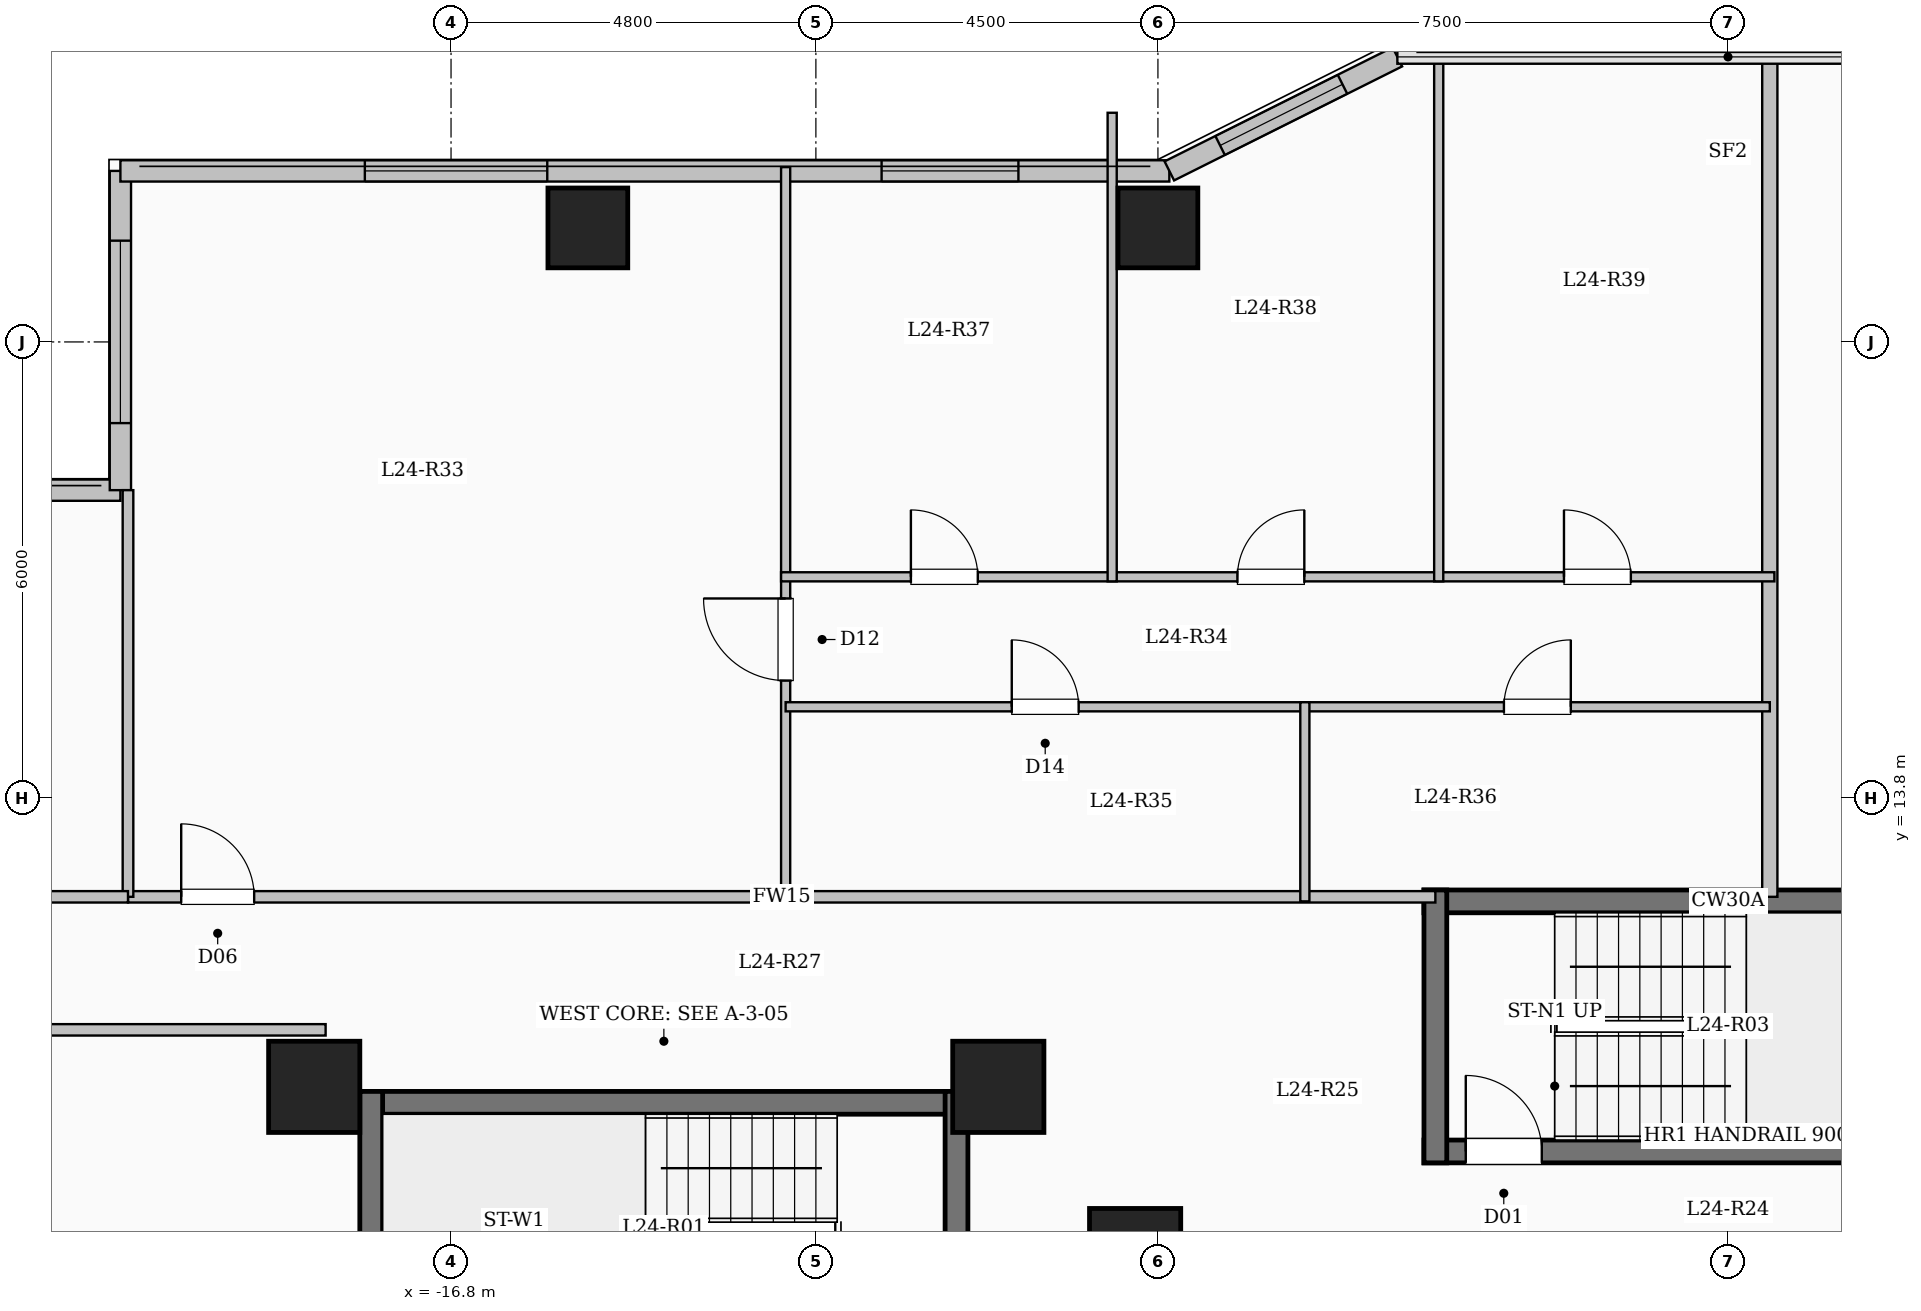
"""IFC4 building model, lengths in metres.
Left out: names, types, materials, properties, quantities, classifications, styles, units other than length and angle.
Written with IfcOpenShell. Run it as: python <this file> out.ifc"""

import sys

from ifc_helpers import new_model, si_unit, direction, frame, frame_2d, origin, origin_2d, place, context, subcontext, project, spatial, rectangle, extrude, element, fill, save


model = new_model("IFC4")
c1 = context("Model", 3, precision=1e-05, world=origin(), true_north=direction((0.0, 1.0)))
c2 = subcontext(c1, "Body", "Model", "MODEL_VIEW")
j1 = project(units=[si_unit("LENGTHUNIT", "METRE"), si_unit("PLANEANGLEUNIT", "RADIAN")], contexts=[c1])
p1 = place(None, origin())
s1 = spatial("IfcSite", under=j1, at=p1, CompositionType="ELEMENT")
p2 = place(p1, origin())
s2 = spatial("IfcBuilding", under=s1, at=p2, CompositionType="ELEMENT")
p3 = place(p2, frame((0.0, 0.0, 91.7)))
s3 = spatial("IfcBuildingStorey", under=s2, at=p3, CompositionType="ELEMENT", Elevation=91.7)
for number, where, z_axis, x_axis in (
    (1, (-7.8, 7.8, 0.0), (0.0, 0.0, 1.0), (1.0, 0.0, 0.0)),
    (2, (-9.6, 10.0, 0.0), (0.0, 0.0, 1.0), (1.0, 0.0, 0.0)),
    (3, (-18.6, 10.0, 0.0), (0.0, 0.0, 1.0), (1.0, 0.0, 0.0)),
):
    element("IfcColumn", number, at=place(p3, frame(where, z_axis=z_axis, x_axis=x_axis)), inside=s3, PredefinedType="COLUMN", context=c2, shape_type="SweptSolid", body=[
        extrude(rectangle(XDim=1.2, YDim=1.2, at=origin_2d()), origin(), (0.0, 0.0, 1.0), 3.35),
    ])
for number, where, z_axis, x_axis in (
    (4, (-15.0, 21.3, 0.0), (0.0, 0.0, 1.0), (1.0, 0.0, 0.0)),
    (5, (-7.5, 21.3, 0.0), (0.0, 0.0, 1.0), (1.0, 0.0, 0.0)),
):
    element("IfcColumn", number, at=place(p3, frame(where, z_axis=z_axis, x_axis=x_axis)), inside=s3, PredefinedType="COLUMN", context=c2, shape_type="SweptSolid", body=[
        extrude(rectangle(XDim=1.05, YDim=1.05, at=origin_2d()), origin(), (0.0, 0.0, 1.0), 3.35),
    ])
p4 = place(p3, frame((-26.85, 17.85, 0.0), z_axis=(0.0, 0.0, 1.0), x_axis=(1.0, 0.0, 0.0)))
e6 = element("IfcWall", 6, at=p4, inside=s3, PredefinedType="SOLIDWALL", context=c2, shape_type="SweptSolid", body=[
    extrude(rectangle(XDim=5.7, YDim=0.28, at=frame_2d((2.85, 0.0))), origin(), (0.0, 0.0, 1.0), 3.1),
])
p5 = place(p4, frame((1.875, 0.0, 0.9)))
e7 = element("IfcOpeningElement", 7, at=p5, cuts=e6, PredefinedType="OPENING", context=c2, shape_type="SweptSolid", body=[
    extrude(rectangle(XDim=2.0, YDim=1.7, at=frame_2d((1.0, 0.85))), frame((0.0, 0.15, 0.0), z_axis=(0.0, -1.0, 0.0), x_axis=(1.0, 0.0, 0.0)), (0.0, 0.0, 1.0), 0.3),
])
p6 = place(p3, frame((-21.15, 17.85, 0.0), z_axis=(0.0, 0.0, 1.0), x_axis=(0.0, 1.0, 0.0)))
e8 = element("IfcWall", 8, at=p6, inside=s3, PredefinedType="SOLIDWALL", context=c2, shape_type="SweptSolid", body=[
    extrude(rectangle(XDim=4.2, YDim=0.28, at=frame_2d((2.1, 0.0))), origin(), (0.0, 0.0, 1.0), 3.1),
])
p7 = place(p6, frame((0.882, 0.0, 0.9)))
e9 = element("IfcOpeningElement", 9, at=p7, cuts=e8, PredefinedType="OPENING", context=c2, shape_type="SweptSolid", body=[
    extrude(rectangle(XDim=2.4, YDim=1.8, at=frame_2d((1.2, 0.9))), frame((0.0, 0.15, 0.0), z_axis=(0.0, -1.0, 0.0), x_axis=(1.0, 0.0, 0.0)), (0.0, 0.0, 1.0), 0.3),
])
p8 = place(p3, frame((-21.15, 22.05, 0.0), z_axis=(0.0, 0.0, 1.0), x_axis=(1.0, 0.0, 0.0)))
e10 = element("IfcWall", 10, at=p8, inside=s3, PredefinedType="SOLIDWALL", context=c2, shape_type="SweptSolid", body=[
    extrude(rectangle(XDim=13.8, YDim=0.28, at=frame_2d((6.9, 0.0))), origin(), (0.0, 0.0, 1.0), 3.1),
])
p9 = place(p8, frame((3.216, 0.0, 0.9)))
e11 = element("IfcOpeningElement", 11, at=p9, cuts=e10, PredefinedType="OPENING", context=c2, shape_type="SweptSolid", body=[
    extrude(rectangle(XDim=2.4, YDim=1.8, at=frame_2d((1.2, 0.9))), frame((0.0, 0.15, 0.0), z_axis=(0.0, -1.0, 0.0), x_axis=(1.0, 0.0, 0.0)), (0.0, 0.0, 1.0), 0.3),
])
p10 = place(p8, frame((10.014, 0.0, 0.9)))
e12 = element("IfcOpeningElement", 12, at=p10, cuts=e10, PredefinedType="OPENING", context=c2, shape_type="SweptSolid", body=[
    extrude(rectangle(XDim=1.8, YDim=1.65, at=frame_2d((0.9, 0.825))), frame((0.0, 0.15, 0.0), z_axis=(0.0, -1.0, 0.0), x_axis=(1.0, 0.0, 0.0)), (0.0, 0.0, 1.0), 0.3),
])
p11 = place(p3, frame((-7.35, 22.05, 0.0), z_axis=(0.0, 0.0, 1.0), x_axis=(0.894427191, 0.4472135955, 0.0)))
e13 = element("IfcWall", 13, at=p11, inside=s3, PredefinedType="SOLIDWALL", context=c2, shape_type="SweptSolid", body=[
    extrude(rectangle(XDim=3.354, YDim=0.28, at=frame_2d((1.677, 0.0))), origin(), (0.0, 0.0, 1.0), 3.1),
])
p12 = place(p11, frame((0.747, 0.0, 0.9)))
e14 = element("IfcOpeningElement", 14, at=p12, cuts=e13, PredefinedType="OPENING", context=c2, shape_type="SweptSolid", body=[
    extrude(rectangle(XDim=1.8, YDim=1.65, at=frame_2d((0.9, 0.825))), frame((0.0, 0.15, 0.0), z_axis=(0.0, -1.0, 0.0), x_axis=(1.0, 0.0, 0.0)), (0.0, 0.0, 1.0), 0.3),
])
p13 = place(p3, frame((-18.0, 9.79, 0.0), z_axis=(0.0, 0.0, 1.0), x_axis=(1.0, 0.0, 0.0)))
e15 = element("IfcWall", 15, at=p13, inside=s3, PredefinedType="SHEAR", context=c2, shape_type="SweptSolid", body=[
    extrude(rectangle(XDim=8.0, YDim=0.3, at=frame_2d((4.0, 0.0))), origin(), (0.0, 0.0, 1.0), 3.35),
])
for number, where, z_axis, x_axis in (
    (16, (-17.85, 6.35, 0.0), (0.0, 0.0, 1.0), (0.0, 1.0, 0.0)),
    (17, (-10.15, 6.35, 0.0), (0.0, 0.0, 1.0), (0.0, 1.0, 0.0)),
):
    element("IfcWall", number, at=place(p3, frame(where, z_axis=z_axis, x_axis=x_axis)), inside=s3, PredefinedType="SHEAR", context=c2, shape_type="SweptSolid", body=[
        extrude(rectangle(XDim=3.59, YDim=0.3, at=frame_2d((1.795, 0.0))), origin(), (0.0, 0.0, 1.0), 3.35),
    ])
p14 = place(p3, frame((-4.0, 12.44, 0.0), z_axis=(0.0, 0.0, 1.0), x_axis=(1.0, 0.0, 0.0)))
e18 = element("IfcWall", 18, at=p14, inside=s3, PredefinedType="SHEAR", context=c2, shape_type="SweptSolid", body=[
    extrude(rectangle(XDim=8.0, YDim=0.3, at=frame_2d((4.0, 0.0))), origin(), (0.0, 0.0, 1.0), 3.35),
])
p15 = place(p3, frame((-4.0, 9.15, 0.0), z_axis=(0.0, 0.0, 1.0), x_axis=(1.0, 0.0, 0.0)))
e19 = element("IfcWall", 19, at=p15, inside=s3, PredefinedType="SHEAR", context=c2, shape_type="SweptSolid", body=[
    extrude(rectangle(XDim=8.0, YDim=0.3, at=frame_2d((4.0, 0.0))), origin(), (0.0, 0.0, 1.0), 3.35),
])
p16 = place(p15, frame((0.55, 0.0, 0.0)))
e20 = element("IfcOpeningElement", 20, at=p16, cuts=e19, PredefinedType="OPENING", context=c2, shape_type="SweptSolid", body=[
    extrude(rectangle(XDim=1.0, YDim=2.15, at=frame_2d((0.5, 1.075))), frame((0.0, 0.16, 0.0), z_axis=(0.0, -1.0, 0.0), x_axis=(1.0, 0.0, 0.0)), (0.0, 0.0, 1.0), 0.32),
])
p17 = place(p3, frame((-3.85, 9.0, 0.0), z_axis=(0.0, 0.0, 1.0), x_axis=(0.0, 1.0, 0.0)))
e21 = element("IfcWall", 21, at=p17, inside=s3, PredefinedType="SHEAR", context=c2, shape_type="SweptSolid", body=[
    extrude(rectangle(XDim=3.59, YDim=0.3, at=frame_2d((1.795, 0.0))), origin(), (0.0, 0.0, 1.0), 3.35),
])
p18 = place(p3, frame((-21.05, 12.5, 0.0), z_axis=(0.0, 0.0, 1.0), x_axis=(1.0, 0.0, 0.0)))
e22 = element("IfcWall", 22, at=p18, inside=s3, PredefinedType="PARTITIONING", context=c2, shape_type="SweptSolid", body=[
    extrude(rectangle(XDim=17.2, YDim=0.15, at=frame_2d((8.6, 0.0))), origin(), (0.0, 0.0, 1.0), 3.1),
])
p19 = place(p18, frame((0.7, 0.0, 0.0)))
e23 = element("IfcOpeningElement", 23, at=p19, cuts=e22, PredefinedType="OPENING", context=c2, shape_type="SweptSolid", body=[
    extrude(rectangle(XDim=0.96, YDim=2.15, at=frame_2d((0.48, 1.075))), frame((0.0, 0.085, 0.0), z_axis=(0.0, -1.0, 0.0), x_axis=(1.0, 0.0, 0.0)), (0.0, 0.0, 1.0), 0.17),
])
p20 = place(p3, frame((0.55, 12.5, 0.0), z_axis=(0.0, 0.0, 1.0), x_axis=(0.0, 1.0, 0.0)))
e24 = element("IfcWall", 24, at=p20, inside=s3, PredefinedType="SOLIDWALL", context=c2, shape_type="SweptSolid", body=[
    extrude(rectangle(XDim=11.08, YDim=0.2, at=frame_2d((5.54, 0.0))), origin(), (0.0, 0.0, 1.0), 3.1),
])
p21 = place(p3, frame((-12.398, 12.44, 0.0), z_axis=(0.0, 0.0, 1.0), x_axis=(0.0, 1.0, 0.0)))
e25 = element("IfcWall", 25, at=p21, inside=s3, PredefinedType="PARTITIONING", context=c2, shape_type="SweptSolid", body=[
    extrude(rectangle(XDim=9.66, YDim=0.12, at=frame_2d((4.83, 0.0))), origin(), (0.0, 0.0, 1.0), 3.1),
])
p22 = place(p21, frame((2.905, 0.0, 0.0)))
e26 = element("IfcOpeningElement", 26, at=p22, cuts=e25, PredefinedType="OPENING", context=c2, shape_type="SweptSolid", body=[
    extrude(rectangle(XDim=1.08, YDim=2.15, at=frame_2d((0.54, 1.075))), frame((0.0, 0.07, 0.0), z_axis=(0.0, -1.0, 0.0), x_axis=(1.0, 0.0, 0.0)), (0.0, 0.0, 1.0), 0.14),
])
p23 = place(p3, frame((-12.398, 15.0, 0.0), z_axis=(0.0, 0.0, 1.0), x_axis=(1.0, 0.0, 0.0)))
e27 = element("IfcWall", 27, at=p23, inside=s3, PredefinedType="PARTITIONING", context=c2, shape_type="SweptSolid", body=[
    extrude(rectangle(XDim=6.831, YDim=0.12, at=frame_2d((3.416, 0.0))), origin(), (0.0, 0.0, 1.0), 3.1),
])
p24 = place(p23, frame((2.975, 0.0, 0.0)))
e28 = element("IfcOpeningElement", 28, at=p24, cuts=e27, PredefinedType="OPENING", context=c2, shape_type="SweptSolid", body=[
    extrude(rectangle(XDim=0.88, YDim=2.1, at=frame_2d((0.44, 1.05))), frame((0.0, 0.07, 0.0), z_axis=(0.0, -1.0, 0.0), x_axis=(1.0, 0.0, 0.0)), (0.0, 0.0, 1.0), 0.14),
])
p25 = place(p3, frame((-5.567, 15.0, 0.0), z_axis=(0.0, 0.0, 1.0), x_axis=(1.0, 0.0, 0.0)))
e29 = element("IfcWall", 29, at=p25, inside=s3, PredefinedType="PARTITIONING", context=c2, shape_type="SweptSolid", body=[
    extrude(rectangle(XDim=6.117, YDim=0.12, at=frame_2d((3.059, 0.0))), origin(), (0.0, 0.0, 1.0), 3.1),
])
p26 = place(p25, frame((2.619, 0.0, 0.0)))
e30 = element("IfcOpeningElement", 30, at=p26, cuts=e29, PredefinedType="OPENING", context=c2, shape_type="SweptSolid", body=[
    extrude(rectangle(XDim=0.88, YDim=2.1, at=frame_2d((0.44, 1.05))), frame((0.0, 0.07, 0.0), z_axis=(0.0, -1.0, 0.0), x_axis=(1.0, 0.0, 0.0)), (0.0, 0.0, 1.0), 0.14),
])
p27 = place(p3, frame((-12.458, 16.71, 0.0), z_axis=(0.0, 0.0, 1.0), x_axis=(1.0, 0.0, 0.0)))
e31 = element("IfcWall", 31, at=p27, inside=s3, PredefinedType="PARTITIONING", context=c2, shape_type="SweptSolid", body=[
    extrude(rectangle(XDim=13.068, YDim=0.12, at=frame_2d((6.534, 0.0))), origin(), (0.0, 0.0, 1.0), 3.1),
])
p28 = place(p27, frame((1.708, 0.0, 0.0)))
e32 = element("IfcOpeningElement", 32, at=p28, cuts=e31, PredefinedType="OPENING", context=c2, shape_type="SweptSolid", body=[
    extrude(rectangle(XDim=0.88, YDim=2.1, at=frame_2d((0.44, 1.05))), frame((0.0, 0.07, 0.0), z_axis=(0.0, -1.0, 0.0), x_axis=(1.0, 0.0, 0.0)), (0.0, 0.0, 1.0), 0.14),
])
p29 = place(p27, frame((6.004, 0.0, 0.0)))
e33 = element("IfcOpeningElement", 33, at=p29, cuts=e31, PredefinedType="OPENING", context=c2, shape_type="SweptSolid", body=[
    extrude(rectangle(XDim=0.88, YDim=2.1, at=frame_2d((0.44, 1.05))), frame((0.0, 0.07, 0.0), z_axis=(0.0, -1.0, 0.0), x_axis=(1.0, 0.0, 0.0)), (0.0, 0.0, 1.0), 0.14),
])
p30 = place(p27, frame((10.3, 0.0, 0.0)))
e34 = element("IfcOpeningElement", 34, at=p30, cuts=e31, PredefinedType="OPENING", context=c2, shape_type="SweptSolid", body=[
    extrude(rectangle(XDim=0.88, YDim=2.1, at=frame_2d((0.44, 1.05))), frame((0.0, 0.07, 0.0), z_axis=(0.0, -1.0, 0.0), x_axis=(1.0, 0.0, 0.0)), (0.0, 0.0, 1.0), 0.14),
])
p31 = place(p3, frame((-5.567, 12.44, 0.0), z_axis=(0.0, 0.0, 1.0), x_axis=(0.0, 1.0, 0.0)))
e35 = element("IfcWall", 35, at=p31, inside=s3, PredefinedType="PARTITIONING", context=c2, shape_type="SweptSolid", body=[
    extrude(rectangle(XDim=2.62, YDim=0.12, at=frame_2d((1.31, 0.0))), origin(), (0.0, 0.0, 1.0), 3.1),
])
p32 = place(p3, frame((-8.102, 16.65, 0.0), z_axis=(0.0, 0.0, 1.0), x_axis=(0.0, 1.0, 0.0)))
e36 = element("IfcWall", 36, at=p32, inside=s3, PredefinedType="PARTITIONING", context=c2, shape_type="SweptSolid", body=[
    extrude(rectangle(XDim=6.165, YDim=0.12, at=frame_2d((3.083, 0.0))), origin(), (0.0, 0.0, 1.0), 2.435),
])
p33 = place(p3, frame((-3.806, 16.65, 0.0), z_axis=(0.0, 0.0, 1.0), x_axis=(0.0, 1.0, 0.0)))
e37 = element("IfcWall", 37, at=p33, inside=s3, PredefinedType="PARTITIONING", context=c2, shape_type="SweptSolid", body=[
    extrude(rectangle(XDim=6.93, YDim=0.12, at=frame_2d((3.465, 0.0))), origin(), (0.0, 0.0, 1.0), 3.1),
])
p34 = place(p3, frame((-26.88, 10.75, 0.0), z_axis=(0.0, 0.0, 1.0), x_axis=(1.0, 0.0, 0.0)))
e38 = element("IfcWall", 38, at=p34, inside=s3, PredefinedType="PARTITIONING", context=c2, shape_type="SweptSolid", body=[
    extrude(rectangle(XDim=8.43, YDim=0.15, at=frame_2d((4.215, 0.0))), origin(), (0.0, 0.0, 1.0), 3.1),
])
p35 = place(p3, frame((-21.05, 12.5, 0.0), z_axis=(0.0, 0.0, 1.0), x_axis=(0.0, 1.0, 0.0)))
e39 = element("IfcWall", 39, at=p35, inside=s3, PredefinedType="PARTITIONING", context=c2, shape_type="SweptSolid", body=[
    extrude(rectangle(XDim=5.35, YDim=0.14, at=frame_2d((2.675, 0.0))), origin(), (0.0, 0.0, 1.0), 3.1),
])
p36 = place(p3, frame((-26.88, 12.5, 0.0), z_axis=(0.0, 0.0, 1.0), x_axis=(1.0, 0.0, 0.0)))
e40 = element("IfcWall", 40, at=p36, inside=s3, PredefinedType="PARTITIONING", context=c2, shape_type="SweptSolid", body=[
    extrude(rectangle(XDim=5.83, YDim=0.15, at=frame_2d((2.915, 0.0))), origin(), (0.0, 0.0, 1.0), 3.1),
])
p37 = place(p36, frame((2.44, 0.0, 0.0)))
e41 = element("IfcOpeningElement", 41, at=p37, cuts=e40, PredefinedType="OPENING", context=c2, shape_type="SweptSolid", body=[
    extrude(rectangle(XDim=0.95, YDim=2.15, at=frame_2d((0.475, 1.075))), frame((0.0, 0.085, 0.0), z_axis=(0.0, -1.0, 0.0), x_axis=(1.0, 0.0, 0.0)), (0.0, 0.0, 1.0), 0.17),
])
p38 = place(p7, origin())
e42 = element("IfcWindow", 42, at=p38, inside=s3, PartitioningType="SINGLE_PANEL", PredefinedType="WINDOW", context=c2, shape_type="SweptSolid", body=[
    extrude(rectangle(XDim=2.4, YDim=1.8, at=frame_2d((1.2, 0.9))), frame((0.0, 0.03, 0.0), z_axis=(0.0, -1.0, 0.0), x_axis=(1.0, 0.0, 0.0)), (0.0, 0.0, 1.0), 0.06),
])
fill(e9, e42)
p39 = place(p9, origin())
e43 = element("IfcWindow", 43, at=p39, inside=s3, PartitioningType="SINGLE_PANEL", PredefinedType="WINDOW", context=c2, shape_type="SweptSolid", body=[
    extrude(rectangle(XDim=2.4, YDim=1.8, at=frame_2d((1.2, 0.9))), frame((0.0, 0.03, 0.0), z_axis=(0.0, -1.0, 0.0), x_axis=(1.0, 0.0, 0.0)), (0.0, 0.0, 1.0), 0.06),
])
fill(e11, e43)
p40 = place(p10, origin())
e44 = element("IfcWindow", 44, at=p40, inside=s3, PartitioningType="SINGLE_PANEL", PredefinedType="WINDOW", context=c2, shape_type="SweptSolid", body=[
    extrude(rectangle(XDim=1.8, YDim=1.65, at=frame_2d((0.9, 0.825))), frame((0.0, 0.03, 0.0), z_axis=(0.0, -1.0, 0.0), x_axis=(1.0, 0.0, 0.0)), (0.0, 0.0, 1.0), 0.06),
])
fill(e12, e44)
p41 = place(p12, origin())
e45 = element("IfcWindow", 45, at=p41, inside=s3, PartitioningType="SINGLE_PANEL", PredefinedType="WINDOW", context=c2, shape_type="SweptSolid", body=[
    extrude(rectangle(XDim=1.8, YDim=1.65, at=frame_2d((0.9, 0.825))), frame((0.0, 0.03, 0.0), z_axis=(0.0, -1.0, 0.0), x_axis=(1.0, 0.0, 0.0)), (0.0, 0.0, 1.0), 0.06),
])
fill(e14, e45)
p42 = place(p16, origin())
e46 = element("IfcDoor", 46, at=p42, inside=s3, OperationType="SINGLE_SWING_LEFT", PredefinedType="DOOR", context=c2, shape_type="SweptSolid", body=[
    extrude(rectangle(XDim=1.0, YDim=2.15, at=frame_2d((0.5, 1.075))), frame((0.0, 0.025, 0.0), z_axis=(0.0, -1.0, 0.0), x_axis=(1.0, 0.0, 0.0)), (0.0, 0.0, 1.0), 0.05),
])
fill(e20, e46)
p43 = place(p19, origin())
e47 = element("IfcDoor", 47, at=p43, inside=s3, OperationType="SINGLE_SWING_LEFT", PredefinedType="DOOR", context=c2, shape_type="SweptSolid", body=[
    extrude(rectangle(XDim=0.96, YDim=2.15, at=frame_2d((0.48, 1.075))), frame((0.0, 0.025, 0.0), z_axis=(0.0, -1.0, 0.0), x_axis=(1.0, 0.0, 0.0)), (0.0, 0.0, 1.0), 0.05),
])
fill(e23, e47)
p44 = place(p22, origin())
e48 = element("IfcDoor", 48, at=p44, inside=s3, OperationType="SINGLE_SWING_RIGHT", PredefinedType="DOOR", context=c2, shape_type="SweptSolid", body=[
    extrude(rectangle(XDim=1.08, YDim=2.15, at=frame_2d((0.54, 1.075))), frame((0.0, 0.025, 0.0), z_axis=(0.0, -1.0, 0.0), x_axis=(1.0, 0.0, 0.0)), (0.0, 0.0, 1.0), 0.05),
])
fill(e26, e48)
p45 = place(p24, origin())
e49 = element("IfcDoor", 49, at=p45, inside=s3, OperationType="SINGLE_SWING_LEFT", PredefinedType="DOOR", context=c2, shape_type="SweptSolid", body=[
    extrude(rectangle(XDim=0.88, YDim=2.1, at=frame_2d((0.44, 1.05))), frame((0.0, 0.025, 0.0), z_axis=(0.0, -1.0, 0.0), x_axis=(1.0, 0.0, 0.0)), (0.0, 0.0, 1.0), 0.05),
])
fill(e28, e49)
p46 = place(p26, origin())
e50 = element("IfcDoor", 50, at=p46, inside=s3, OperationType="SINGLE_SWING_RIGHT", PredefinedType="DOOR", context=c2, shape_type="SweptSolid", body=[
    extrude(rectangle(XDim=0.88, YDim=2.1, at=frame_2d((0.44, 1.05))), frame((0.0, 0.025, 0.0), z_axis=(0.0, -1.0, 0.0), x_axis=(1.0, 0.0, 0.0)), (0.0, 0.0, 1.0), 0.05),
])
fill(e30, e50)
p47 = place(p28, origin())
e51 = element("IfcDoor", 51, at=p47, inside=s3, OperationType="SINGLE_SWING_LEFT", PredefinedType="DOOR", context=c2, shape_type="SweptSolid", body=[
    extrude(rectangle(XDim=0.88, YDim=2.1, at=frame_2d((0.44, 1.05))), frame((0.0, 0.025, 0.0), z_axis=(0.0, -1.0, 0.0), x_axis=(1.0, 0.0, 0.0)), (0.0, 0.0, 1.0), 0.05),
])
fill(e32, e51)
p48 = place(p29, origin())
e52 = element("IfcDoor", 52, at=p48, inside=s3, OperationType="SINGLE_SWING_RIGHT", PredefinedType="DOOR", context=c2, shape_type="SweptSolid", body=[
    extrude(rectangle(XDim=0.88, YDim=2.1, at=frame_2d((0.44, 1.05))), frame((0.0, 0.025, 0.0), z_axis=(0.0, -1.0, 0.0), x_axis=(1.0, 0.0, 0.0)), (0.0, 0.0, 1.0), 0.05),
])
fill(e33, e52)
p49 = place(p30, origin())
e53 = element("IfcDoor", 53, at=p49, inside=s3, OperationType="SINGLE_SWING_LEFT", PredefinedType="DOOR", context=c2, shape_type="SweptSolid", body=[
    extrude(rectangle(XDim=0.88, YDim=2.1, at=frame_2d((0.44, 1.05))), frame((0.0, 0.025, 0.0), z_axis=(0.0, -1.0, 0.0), x_axis=(1.0, 0.0, 0.0)), (0.0, 0.0, 1.0), 0.05),
])
fill(e34, e53)
save(model, sys.argv[1])
